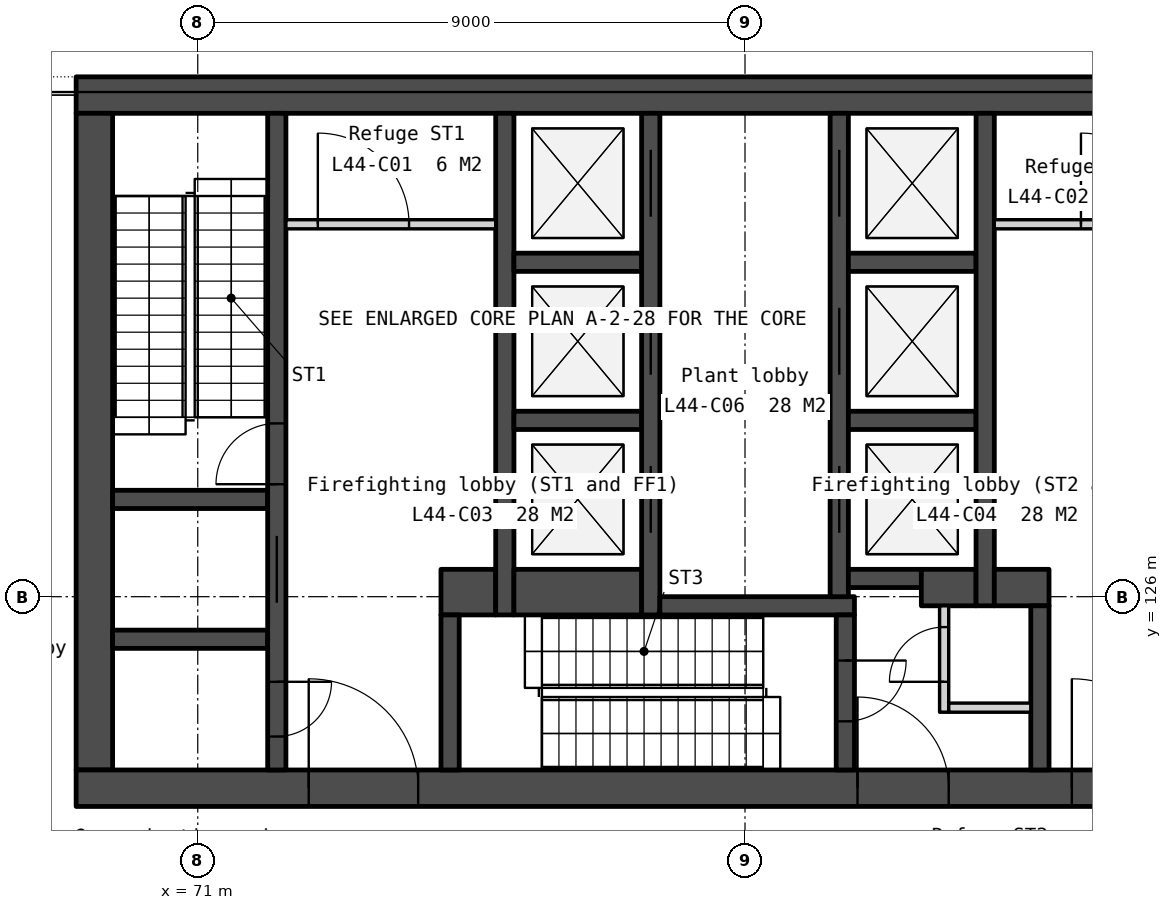
"""IFC4 building model, lengths in metres.
Left out: names, types, materials, properties, quantities, classifications, styles, units other than length and angle.
Written with IfcOpenShell. Run it as: python <this file> out.ifc"""

import sys

from ifc_helpers import new_model, si_unit, direction, frame, frame_2d, origin, place, context, subcontext, project, spatial, rectangle, extrude, element, fill, save


model = new_model("IFC4")
c1 = context("Model", 3, precision=1e-05, world=origin(), true_north=direction((0.0, 1.0)))
c2 = subcontext(c1, "Body", "Model", "MODEL_VIEW")
j1 = project(units=[si_unit("LENGTHUNIT", "METRE"), si_unit("PLANEANGLEUNIT", "RADIAN")], contexts=[c1])
p1 = place(None, origin())
s1 = spatial("IfcSite", under=j1, at=p1, CompositionType="ELEMENT")
p2 = place(p1, origin())
s2 = spatial("IfcBuilding", under=s1, at=p2, CompositionType="ELEMENT")
p3 = place(p2, frame((0.0, 0.0, 175.4)))
s3 = spatial("IfcBuildingStorey", under=s2, at=p3, CompositionType="ELEMENT", Elevation=175.4)
p4 = place(p3, frame((69.0, 134.25, 0.0), z_axis=(0.0, 0.0, 1.0), x_axis=(1.0, 0.0, 0.0)))
e1 = element("IfcWall", 1, at=p4, inside=s3, PredefinedType="SOLIDWALL", context=c2, shape_type="SweptSolid", body=[
    extrude(rectangle(XDim=22.0, YDim=0.6, at=frame_2d((11.0, 0.0))), origin(), (0.0, 0.0, 1.0), 4.35),
])
p5 = place(p3, frame((69.3, 133.95, 0.0), z_axis=(0.0, 0.0, 1.0), x_axis=(0.0, -1.0, 0.0)))
e2 = element("IfcWall", 2, at=p5, inside=s3, PredefinedType="SOLIDWALL", context=c2, shape_type="SweptSolid", body=[
    extrude(rectangle(XDim=10.8, YDim=0.6, at=frame_2d((5.4, 0.0))), origin(), (0.0, 0.0, 1.0), 4.35),
])
p6 = place(p3, frame((69.0, 122.85, 0.0), z_axis=(0.0, 0.0, 1.0), x_axis=(1.0, 0.0, 0.0)))
e3 = element("IfcWall", 3, at=p6, inside=s3, PredefinedType="SOLIDWALL", context=c2, shape_type="SweptSolid", body=[
    extrude(rectangle(XDim=22.0, YDim=0.6, at=frame_2d((11.0, 0.0))), origin(), (0.0, 0.0, 1.0), 4.35),
])
p7 = place(p6, frame((16.375, 0.0, 0.0)))
e4 = element("IfcOpeningElement", 4, at=p7, cuts=e3, PredefinedType="OPENING", context=c2, shape_type="SweptSolid", body=[
    extrude(rectangle(XDim=1.8, YDim=2.1, at=frame_2d((0.9, 1.05))), frame((0.0, 0.31, 0.0), z_axis=(0.0, -1.0, 0.0), x_axis=(1.0, 0.0, 0.0)), (0.0, 0.0, 1.0), 0.62),
])
p8 = place(p6, frame((3.825, 0.0, 0.0)))
e5 = element("IfcOpeningElement", 5, at=p8, cuts=e3, PredefinedType="OPENING", context=c2, shape_type="SweptSolid", body=[
    extrude(rectangle(XDim=1.8, YDim=2.1, at=frame_2d((0.9, 1.05))), frame((0.0, 0.31, 0.0), z_axis=(0.0, -1.0, 0.0), x_axis=(1.0, 0.0, 0.0)), (0.0, 0.0, 1.0), 0.62),
])
p9 = place(p6, frame((12.85, 0.0, 0.0)))
e6 = element("IfcOpeningElement", 6, at=p9, cuts=e3, PredefinedType="OPENING", context=c2, shape_type="SweptSolid", body=[
    extrude(rectangle(XDim=1.5, YDim=2.1, at=frame_2d((0.75, 1.05))), frame((0.0, 0.31, 0.0), z_axis=(0.0, -1.0, 0.0), x_axis=(1.0, 0.0, 0.0)), (0.0, 0.0, 1.0), 0.62),
])
for number, where, z_axis, x_axis in (
    (7, (69.6, 127.6, 0.0), (0.0, 0.0, 1.0), (1.0, 0.0, 0.0)),
    (8, (69.6, 125.3, 0.0), (0.0, 0.0, 1.0), (1.0, 0.0, 0.0)),
):
    element("IfcWall", number, at=place(p3, frame(where, z_axis=z_axis, x_axis=x_axis)), inside=s3, PredefinedType="SOLIDWALL", context=c2, shape_type="SweptSolid", body=[
        extrude(rectangle(XDim=2.55, YDim=0.3, at=frame_2d((1.275, 0.0))), origin(), (0.0, 0.0, 1.0), 4.35),
    ])
p10 = place(p3, frame((72.3, 133.95, 0.0), z_axis=(0.0, 0.0, 1.0), x_axis=(0.0, -1.0, 0.0)))
e9 = element("IfcWall", 9, at=p10, inside=s3, PredefinedType="SOLIDWALL", context=c2, shape_type="SweptSolid", body=[
    extrude(rectangle(XDim=10.8, YDim=0.3, at=frame_2d((5.4, 0.0))), origin(), (0.0, 0.0, 1.0), 4.35),
])
p11 = place(p10, frame((6.95, 0.0, 0.0)))
e10 = element("IfcOpeningElement", 10, at=p11, cuts=e9, PredefinedType="OPENING", context=c2, shape_type="SweptSolid", body=[
    extrude(rectangle(XDim=1.1, YDim=2.1, at=frame_2d((0.55, 1.05))), frame((0.0, 0.16, 0.0), z_axis=(0.0, -1.0, 0.0), x_axis=(1.0, 0.0, 0.0)), (0.0, 0.0, 1.0), 0.32),
])
p12 = place(p10, frame((9.35, 0.0, 0.0)))
e11 = element("IfcOpeningElement", 11, at=p12, cuts=e9, PredefinedType="OPENING", context=c2, shape_type="SweptSolid", body=[
    extrude(rectangle(XDim=0.9, YDim=2.1, at=frame_2d((0.45, 1.05))), frame((0.0, 0.16, 0.0), z_axis=(0.0, -1.0, 0.0), x_axis=(1.0, 0.0, 0.0)), (0.0, 0.0, 1.0), 0.32),
])
p13 = place(p10, frame((5.1, 0.0, 0.0)))
e12 = element("IfcOpeningElement", 12, at=p13, cuts=e9, PredefinedType="OPENING", context=c2, shape_type="SweptSolid", body=[
    extrude(rectangle(XDim=1.0, YDim=2.1, at=frame_2d((0.5, 1.05))), frame((0.0, 0.16, 0.0), z_axis=(0.0, -1.0, 0.0), x_axis=(1.0, 0.0, 0.0)), (0.0, 0.0, 1.0), 0.32),
])
p14 = place(p3, frame((72.45, 132.125, 0.0), z_axis=(0.0, 0.0, 1.0), x_axis=(1.0, 0.0, 0.0)))
e13 = element("IfcWall", 13, at=p14, inside=s3, PredefinedType="PARTITIONING", context=c2, shape_type="SweptSolid", body=[
    extrude(rectangle(XDim=3.45, YDim=0.15, at=frame_2d((1.725, 0.0))), origin(), (0.0, 0.0, 1.0), 4.35),
])
p15 = place(p14, frame((0.525, 0.0, 0.0)))
e14 = element("IfcOpeningElement", 14, at=p15, cuts=e13, PredefinedType="OPENING", context=c2, shape_type="SweptSolid", body=[
    extrude(rectangle(XDim=1.5, YDim=2.1, at=frame_2d((0.75, 1.05))), frame((0.0, 0.085, 0.0), z_axis=(0.0, -1.0, 0.0), x_axis=(1.0, 0.0, 0.0)), (0.0, 0.0, 1.0), 0.17),
])
p16 = place(p3, frame((75.0, 126.075, 0.0), z_axis=(0.0, 0.0, 1.0), x_axis=(1.0, 0.0, 0.0)))
e15 = element("IfcWall", 15, at=p16, inside=s3, PredefinedType="SOLIDWALL", context=c2, shape_type="SweptSolid", body=[
    extrude(rectangle(XDim=0.9, YDim=0.75, at=frame_2d((0.45, 0.0))), origin(), (0.0, 0.0, 1.0), 4.35),
])
p17 = place(p3, frame((75.15, 125.7, 0.0), z_axis=(0.0, 0.0, 1.0), x_axis=(0.0, -1.0, 0.0)))
e16 = element("IfcWall", 16, at=p17, inside=s3, PredefinedType="SOLIDWALL", context=c2, shape_type="SweptSolid", body=[
    extrude(rectangle(XDim=2.55, YDim=0.3, at=frame_2d((1.275, 0.0))), origin(), (0.0, 0.0, 1.0), 4.35),
])
p18 = place(p3, frame((76.05, 133.95, 0.0), z_axis=(0.0, 0.0, 1.0), x_axis=(0.0, -1.0, 0.0)))
e17 = element("IfcWall", 17, at=p18, inside=s3, PredefinedType="SOLIDWALL", context=c2, shape_type="SweptSolid", body=[
    extrude(rectangle(XDim=8.25, YDim=0.3, at=frame_2d((4.125, 0.0))), origin(), (0.0, 0.0, 1.0), 4.35),
])
for number, where, z_axis, x_axis in (
    (18, (76.2, 131.5, 0.0), (0.0, 0.0, 1.0), (1.0, 0.0, 0.0)),
    (19, (76.2, 128.9, 0.0), (0.0, 0.0, 1.0), (1.0, 0.0, 0.0)),
):
    element("IfcWall", number, at=place(p3, frame(where, z_axis=z_axis, x_axis=x_axis)), inside=s3, PredefinedType="SOLIDWALL", context=c2, shape_type="SweptSolid", body=[
        extrude(rectangle(XDim=2.1, YDim=0.3, at=frame_2d((1.05, 0.0))), origin(), (0.0, 0.0, 1.0), 4.35),
    ])
p19 = place(p3, frame((76.2, 126.075, 0.0), z_axis=(0.0, 0.0, 1.0), x_axis=(1.0, 0.0, 0.0)))
e20 = element("IfcWall", 20, at=p19, inside=s3, PredefinedType="SOLIDWALL", context=c2, shape_type="SweptSolid", body=[
    extrude(rectangle(XDim=2.1, YDim=0.75, at=frame_2d((1.05, 0.0))), origin(), (0.0, 0.0, 1.0), 4.35),
])
p20 = place(p3, frame((78.45, 133.95, 0.0), z_axis=(0.0, 0.0, 1.0), x_axis=(0.0, -1.0, 0.0)))
e21 = element("IfcWall", 21, at=p20, inside=s3, PredefinedType="SOLIDWALL", context=c2, shape_type="SweptSolid", body=[
    extrude(rectangle(XDim=8.25, YDim=0.3, at=frame_2d((4.125, 0.0))), origin(), (0.0, 0.0, 1.0), 4.35),
])
p21 = place(p20, frame((0.6, 0.0, 0.0)))
e22 = element("IfcOpeningElement", 22, at=p21, cuts=e21, PredefinedType="OPENING", context=c2, shape_type="SweptSolid", body=[
    extrude(rectangle(XDim=1.1, YDim=2.1, at=frame_2d((0.55, 1.05))), frame((0.0, 0.16, 0.0), z_axis=(0.0, -1.0, 0.0), x_axis=(1.0, 0.0, 0.0)), (0.0, 0.0, 1.0), 0.32),
])
p22 = place(p20, frame((3.2, 0.0, 0.0)))
e23 = element("IfcOpeningElement", 23, at=p22, cuts=e21, PredefinedType="OPENING", context=c2, shape_type="SweptSolid", body=[
    extrude(rectangle(XDim=1.1, YDim=2.1, at=frame_2d((0.55, 1.05))), frame((0.0, 0.16, 0.0), z_axis=(0.0, -1.0, 0.0), x_axis=(1.0, 0.0, 0.0)), (0.0, 0.0, 1.0), 0.32),
])
p23 = place(p20, frame((5.8, 0.0, 0.0)))
e24 = element("IfcOpeningElement", 24, at=p23, cuts=e21, PredefinedType="OPENING", context=c2, shape_type="SweptSolid", body=[
    extrude(rectangle(XDim=1.1, YDim=2.1, at=frame_2d((0.55, 1.05))), frame((0.0, 0.16, 0.0), z_axis=(0.0, -1.0, 0.0), x_axis=(1.0, 0.0, 0.0)), (0.0, 0.0, 1.0), 0.32),
])
p24 = place(p3, frame((78.6, 125.85, 0.0), z_axis=(0.0, 0.0, 1.0), x_axis=(1.0, 0.0, 0.0)))
e25 = element("IfcWall", 25, at=p24, inside=s3, PredefinedType="SOLIDWALL", context=c2, shape_type="SweptSolid", body=[
    extrude(rectangle(XDim=3.2, YDim=0.3, at=frame_2d((1.6, 0.0))), origin(), (0.0, 0.0, 1.0), 4.35),
])
p25 = place(p3, frame((81.55, 133.95, 0.0), z_axis=(0.0, 0.0, 1.0), x_axis=(0.0, -1.0, 0.0)))
e26 = element("IfcWall", 26, at=p25, inside=s3, PredefinedType="SOLIDWALL", context=c2, shape_type="SweptSolid", body=[
    extrude(rectangle(XDim=7.95, YDim=0.3, at=frame_2d((3.975, 0.0))), origin(), (0.0, 0.0, 1.0), 4.35),
])
p26 = place(p25, frame((0.6, 0.0, 0.0)))
e27 = element("IfcOpeningElement", 27, at=p26, cuts=e26, PredefinedType="OPENING", context=c2, shape_type="SweptSolid", body=[
    extrude(rectangle(XDim=1.1, YDim=2.1, at=frame_2d((0.55, 1.05))), frame((0.0, 0.16, 0.0), z_axis=(0.0, -1.0, 0.0), x_axis=(1.0, 0.0, 0.0)), (0.0, 0.0, 1.0), 0.32),
])
p27 = place(p25, frame((3.2, 0.0, 0.0)))
e28 = element("IfcOpeningElement", 28, at=p27, cuts=e26, PredefinedType="OPENING", context=c2, shape_type="SweptSolid", body=[
    extrude(rectangle(XDim=1.1, YDim=2.1, at=frame_2d((0.55, 1.05))), frame((0.0, 0.16, 0.0), z_axis=(0.0, -1.0, 0.0), x_axis=(1.0, 0.0, 0.0)), (0.0, 0.0, 1.0), 0.32),
])
p28 = place(p25, frame((5.8, 0.0, 0.0)))
e29 = element("IfcOpeningElement", 29, at=p28, cuts=e26, PredefinedType="OPENING", context=c2, shape_type="SweptSolid", body=[
    extrude(rectangle(XDim=1.1, YDim=2.1, at=frame_2d((0.55, 1.05))), frame((0.0, 0.16, 0.0), z_axis=(0.0, -1.0, 0.0), x_axis=(1.0, 0.0, 0.0)), (0.0, 0.0, 1.0), 0.32),
])
p29 = place(p3, frame((81.65, 125.7, 0.0), z_axis=(0.0, 0.0, 1.0), x_axis=(0.0, -1.0, 0.0)))
e30 = element("IfcWall", 30, at=p29, inside=s3, PredefinedType="SOLIDWALL", context=c2, shape_type="SweptSolid", body=[
    extrude(rectangle(XDim=2.55, YDim=0.3, at=frame_2d((1.275, 0.0))), origin(), (0.0, 0.0, 1.0), 4.35),
])
p30 = place(p29, frame((0.75, 0.0, 0.0)))
e31 = element("IfcOpeningElement", 31, at=p30, cuts=e30, PredefinedType="OPENING", context=c2, shape_type="SweptSolid", body=[
    extrude(rectangle(XDim=1.0, YDim=2.1, at=frame_2d((0.5, 1.05))), frame((0.0, 0.16, 0.0), z_axis=(0.0, -1.0, 0.0), x_axis=(1.0, 0.0, 0.0)), (0.0, 0.0, 1.0), 0.32),
])
for number, where, z_axis, x_axis in (
    (32, (81.7, 131.5, 0.0), (0.0, 0.0, 1.0), (1.0, 0.0, 0.0)),
    (33, (81.7, 128.9, 0.0), (0.0, 0.0, 1.0), (1.0, 0.0, 0.0)),
):
    element("IfcWall", number, at=place(p3, frame(where, z_axis=z_axis, x_axis=x_axis)), inside=s3, PredefinedType="SOLIDWALL", context=c2, shape_type="SweptSolid", body=[
        extrude(rectangle(XDim=2.1, YDim=0.3, at=frame_2d((1.05, 0.0))), origin(), (0.0, 0.0, 1.0), 4.35),
    ])
p31 = place(p3, frame((81.7, 126.3, 0.0), z_axis=(0.0, 0.0, 1.0), x_axis=(1.0, 0.0, 0.0)))
e34 = element("IfcWall", 34, at=p31, inside=s3, PredefinedType="SOLIDWALL", context=c2, shape_type="SweptSolid", body=[
    extrude(rectangle(XDim=1.2, YDim=0.3, at=frame_2d((0.6, 0.0))), origin(), (0.0, 0.0, 1.0), 4.35),
])
p32 = place(p3, frame((82.9, 126.15, 0.0), z_axis=(0.0, 0.0, 1.0), x_axis=(1.0, 0.0, 0.0)))
e35 = element("IfcWall", 35, at=p32, inside=s3, PredefinedType="SOLIDWALL", context=c2, shape_type="SweptSolid", body=[
    extrude(rectangle(XDim=0.9, YDim=0.6, at=frame_2d((0.45, 0.0))), origin(), (0.0, 0.0, 1.0), 4.35),
])
p33 = place(p3, frame((83.275, 125.85, 0.0), z_axis=(0.0, 0.0, 1.0), x_axis=(0.0, -1.0, 0.0)))
e36 = element("IfcWall", 36, at=p33, inside=s3, PredefinedType="PARTITIONING", context=c2, shape_type="SweptSolid", body=[
    extrude(rectangle(XDim=1.75, YDim=0.15, at=frame_2d((0.875, 0.0))), origin(), (0.0, 0.0, 1.0), 4.35),
])
p34 = place(p33, frame((0.35, 0.0, 0.0)))
e37 = element("IfcOpeningElement", 37, at=p34, cuts=e36, PredefinedType="OPENING", context=c2, shape_type="SweptSolid", body=[
    extrude(rectangle(XDim=0.9, YDim=2.1, at=frame_2d((0.45, 1.05))), frame((0.0, 0.085, 0.0), z_axis=(0.0, -1.0, 0.0), x_axis=(1.0, 0.0, 0.0)), (0.0, 0.0, 1.0), 0.17),
])
p35 = place(p3, frame((83.35, 124.175, 0.0), z_axis=(0.0, 0.0, 1.0), x_axis=(1.0, 0.0, 0.0)))
e38 = element("IfcWall", 38, at=p35, inside=s3, PredefinedType="PARTITIONING", context=c2, shape_type="SweptSolid", body=[
    extrude(rectangle(XDim=1.35, YDim=0.15, at=frame_2d((0.675, 0.0))), origin(), (0.0, 0.0, 1.0), 4.35),
])
p36 = place(p3, frame((83.95, 133.95, 0.0), z_axis=(0.0, 0.0, 1.0), x_axis=(0.0, -1.0, 0.0)))
e39 = element("IfcWall", 39, at=p36, inside=s3, PredefinedType="SOLIDWALL", context=c2, shape_type="SweptSolid", body=[
    extrude(rectangle(XDim=8.1, YDim=0.3, at=frame_2d((4.05, 0.0))), origin(), (0.0, 0.0, 1.0), 4.35),
])
p37 = place(p3, frame((84.1, 132.125, 0.0), z_axis=(0.0, 0.0, 1.0), x_axis=(1.0, 0.0, 0.0)))
e40 = element("IfcWall", 40, at=p37, inside=s3, PredefinedType="PARTITIONING", context=c2, shape_type="SweptSolid", body=[
    extrude(rectangle(XDim=3.45, YDim=0.15, at=frame_2d((1.725, 0.0))), origin(), (0.0, 0.0, 1.0), 4.35),
])
p38 = place(p37, frame((1.425, 0.0, 0.0)))
e41 = element("IfcOpeningElement", 41, at=p38, cuts=e40, PredefinedType="OPENING", context=c2, shape_type="SweptSolid", body=[
    extrude(rectangle(XDim=1.5, YDim=2.1, at=frame_2d((0.75, 1.05))), frame((0.0, 0.085, 0.0), z_axis=(0.0, -1.0, 0.0), x_axis=(1.0, 0.0, 0.0)), (0.0, 0.0, 1.0), 0.17),
])
p39 = place(p3, frame((84.1, 126.15, 0.0), z_axis=(0.0, 0.0, 1.0), x_axis=(1.0, 0.0, 0.0)))
e42 = element("IfcWall", 42, at=p39, inside=s3, PredefinedType="SOLIDWALL", context=c2, shape_type="SweptSolid", body=[
    extrude(rectangle(XDim=0.9, YDim=0.6, at=frame_2d((0.45, 0.0))), origin(), (0.0, 0.0, 1.0), 4.35),
])
p40 = place(p3, frame((84.85, 125.85, 0.0), z_axis=(0.0, 0.0, 1.0), x_axis=(0.0, -1.0, 0.0)))
e43 = element("IfcWall", 43, at=p40, inside=s3, PredefinedType="SOLIDWALL", context=c2, shape_type="SweptSolid", body=[
    extrude(rectangle(XDim=2.7, YDim=0.3, at=frame_2d((1.35, 0.0))), origin(), (0.0, 0.0, 1.0), 4.35),
])
p41 = place(p21, origin())
e44 = element("IfcDoor", 44, at=p41, inside=s3, OperationType="SLIDING_TO_RIGHT", PredefinedType="DOOR", context=c2, shape_type="SweptSolid", body=[
    extrude(rectangle(XDim=1.1, YDim=2.1, at=frame_2d((0.55, 1.05))), frame((0.0, 0.025, 0.0), z_axis=(0.0, -1.0, 0.0), x_axis=(1.0, 0.0, 0.0)), (0.0, 0.0, 1.0), 0.05),
])
fill(e22, e44)
p42 = place(p22, origin())
e45 = element("IfcDoor", 45, at=p42, inside=s3, OperationType="SLIDING_TO_RIGHT", PredefinedType="DOOR", context=c2, shape_type="SweptSolid", body=[
    extrude(rectangle(XDim=1.1, YDim=2.1, at=frame_2d((0.55, 1.05))), frame((0.0, 0.025, 0.0), z_axis=(0.0, -1.0, 0.0), x_axis=(1.0, 0.0, 0.0)), (0.0, 0.0, 1.0), 0.05),
])
fill(e23, e45)
p43 = place(p23, origin())
e46 = element("IfcDoor", 46, at=p43, inside=s3, OperationType="SLIDING_TO_RIGHT", PredefinedType="DOOR", context=c2, shape_type="SweptSolid", body=[
    extrude(rectangle(XDim=1.1, YDim=2.1, at=frame_2d((0.55, 1.05))), frame((0.0, 0.025, 0.0), z_axis=(0.0, -1.0, 0.0), x_axis=(1.0, 0.0, 0.0)), (0.0, 0.0, 1.0), 0.05),
])
fill(e24, e46)
p44 = place(p26, origin())
e47 = element("IfcDoor", 47, at=p44, inside=s3, OperationType="SLIDING_TO_LEFT", PredefinedType="DOOR", context=c2, shape_type="SweptSolid", body=[
    extrude(rectangle(XDim=1.1, YDim=2.1, at=frame_2d((0.55, 1.05))), frame((0.0, 0.025, 0.0), z_axis=(0.0, -1.0, 0.0), x_axis=(1.0, 0.0, 0.0)), (0.0, 0.0, 1.0), 0.05),
])
fill(e27, e47)
p45 = place(p27, origin())
e48 = element("IfcDoor", 48, at=p45, inside=s3, OperationType="SLIDING_TO_LEFT", PredefinedType="DOOR", context=c2, shape_type="SweptSolid", body=[
    extrude(rectangle(XDim=1.1, YDim=2.1, at=frame_2d((0.55, 1.05))), frame((0.0, 0.025, 0.0), z_axis=(0.0, -1.0, 0.0), x_axis=(1.0, 0.0, 0.0)), (0.0, 0.0, 1.0), 0.05),
])
fill(e28, e48)
p46 = place(p28, origin())
e49 = element("IfcDoor", 49, at=p46, inside=s3, OperationType="SLIDING_TO_LEFT", PredefinedType="DOOR", context=c2, shape_type="SweptSolid", body=[
    extrude(rectangle(XDim=1.1, YDim=2.1, at=frame_2d((0.55, 1.05))), frame((0.0, 0.025, 0.0), z_axis=(0.0, -1.0, 0.0), x_axis=(1.0, 0.0, 0.0)), (0.0, 0.0, 1.0), 0.05),
])
fill(e29, e49)
p47 = place(p11, origin())
e50 = element("IfcDoor", 50, at=p47, inside=s3, OperationType="SLIDING_TO_LEFT", PredefinedType="DOOR", context=c2, shape_type="SweptSolid", body=[
    extrude(rectangle(XDim=1.1, YDim=2.1, at=frame_2d((0.55, 1.05))), frame((0.0, 0.025, 0.0), z_axis=(0.0, -1.0, 0.0), x_axis=(1.0, 0.0, 0.0)), (0.0, 0.0, 1.0), 0.05),
])
fill(e10, e50)
p48 = place(p7, origin())
e51 = element("IfcDoor", 51, at=p48, inside=s3, OperationType="DOUBLE_DOOR_DOUBLE_SWING", PredefinedType="DOOR", context=c2, shape_type="SweptSolid", body=[
    extrude(rectangle(XDim=1.8, YDim=2.1, at=frame_2d((0.9, 1.05))), frame((0.0, 0.025, 0.0), z_axis=(0.0, -1.0, 0.0), x_axis=(1.0, 0.0, 0.0)), (0.0, 0.0, 1.0), 0.05),
])
fill(e4, e51)
p49 = place(p8, origin())
e52 = element("IfcDoor", 52, at=p49, inside=s3, OperationType="DOUBLE_DOOR_DOUBLE_SWING", PredefinedType="DOOR", context=c2, shape_type="SweptSolid", body=[
    extrude(rectangle(XDim=1.8, YDim=2.1, at=frame_2d((0.9, 1.05))), frame((0.0, 0.025, 0.0), z_axis=(0.0, -1.0, 0.0), x_axis=(1.0, 0.0, 0.0)), (0.0, 0.0, 1.0), 0.05),
])
fill(e5, e52)
p50 = place(p9, origin())
e53 = element("IfcDoor", 53, at=p50, inside=s3, OperationType="DOUBLE_DOOR_DOUBLE_SWING", PredefinedType="DOOR", context=c2, shape_type="SweptSolid", body=[
    extrude(rectangle(XDim=1.5, YDim=2.1, at=frame_2d((0.75, 1.05))), frame((0.0, 0.025, 0.0), z_axis=(0.0, -1.0, 0.0), x_axis=(1.0, 0.0, 0.0)), (0.0, 0.0, 1.0), 0.05),
])
fill(e6, e53)
p51 = place(p34, origin())
e54 = element("IfcDoor", 54, at=p51, inside=s3, OperationType="SINGLE_SWING_RIGHT", PredefinedType="DOOR", context=c2, shape_type="SweptSolid", body=[
    extrude(rectangle(XDim=0.9, YDim=2.1, at=frame_2d((0.45, 1.05))), frame((0.0, 0.025, 0.0), z_axis=(0.0, -1.0, 0.0), x_axis=(1.0, 0.0, 0.0)), (0.0, 0.0, 1.0), 0.05),
])
fill(e37, e54)
p52 = place(p38, origin())
e55 = element("IfcDoor", 55, at=p52, inside=s3, OperationType="DOUBLE_DOOR_DOUBLE_SWING", PredefinedType="DOOR", context=c2, shape_type="SweptSolid", body=[
    extrude(rectangle(XDim=1.5, YDim=2.1, at=frame_2d((0.75, 1.05))), frame((0.0, 0.025, 0.0), z_axis=(0.0, -1.0, 0.0), x_axis=(1.0, 0.0, 0.0)), (0.0, 0.0, 1.0), 0.05),
])
fill(e41, e55)
p53 = place(p15, origin())
e56 = element("IfcDoor", 56, at=p53, inside=s3, OperationType="DOUBLE_DOOR_DOUBLE_SWING", PredefinedType="DOOR", context=c2, shape_type="SweptSolid", body=[
    extrude(rectangle(XDim=1.5, YDim=2.1, at=frame_2d((0.75, 1.05))), frame((0.0, 0.025, 0.0), z_axis=(0.0, -1.0, 0.0), x_axis=(1.0, 0.0, 0.0)), (0.0, 0.0, 1.0), 0.05),
])
fill(e14, e56)
p54 = place(p12, origin())
e57 = element("IfcDoor", 57, at=p54, inside=s3, OperationType="SINGLE_SWING_LEFT", PredefinedType="DOOR", context=c2, shape_type="SweptSolid", body=[
    extrude(rectangle(XDim=0.9, YDim=2.1, at=frame_2d((0.45, 1.05))), frame((0.0, 0.025, 0.0), z_axis=(0.0, -1.0, 0.0), x_axis=(1.0, 0.0, 0.0)), (0.0, 0.0, 1.0), 0.05),
])
fill(e11, e57)
p55 = place(p13, origin())
e58 = element("IfcDoor", 58, at=p55, inside=s3, OperationType="SINGLE_SWING_RIGHT", PredefinedType="DOOR", context=c2, shape_type="SweptSolid", body=[
    extrude(rectangle(XDim=1.0, YDim=2.1, at=frame_2d((0.5, 1.05))), frame((0.0, 0.025, 0.0), z_axis=(0.0, -1.0, 0.0), x_axis=(1.0, 0.0, 0.0)), (0.0, 0.0, 1.0), 0.05),
])
fill(e12, e58)
p56 = place(p30, origin())
e59 = element("IfcDoor", 59, at=p56, inside=s3, OperationType="SINGLE_SWING_LEFT", PredefinedType="DOOR", context=c2, shape_type="SweptSolid", body=[
    extrude(rectangle(XDim=1.0, YDim=2.1, at=frame_2d((0.5, 1.05))), frame((0.0, 0.025, 0.0), z_axis=(0.0, -1.0, 0.0), x_axis=(1.0, 0.0, 0.0)), (0.0, 0.0, 1.0), 0.05),
])
fill(e31, e59)
save(model, sys.argv[1])
